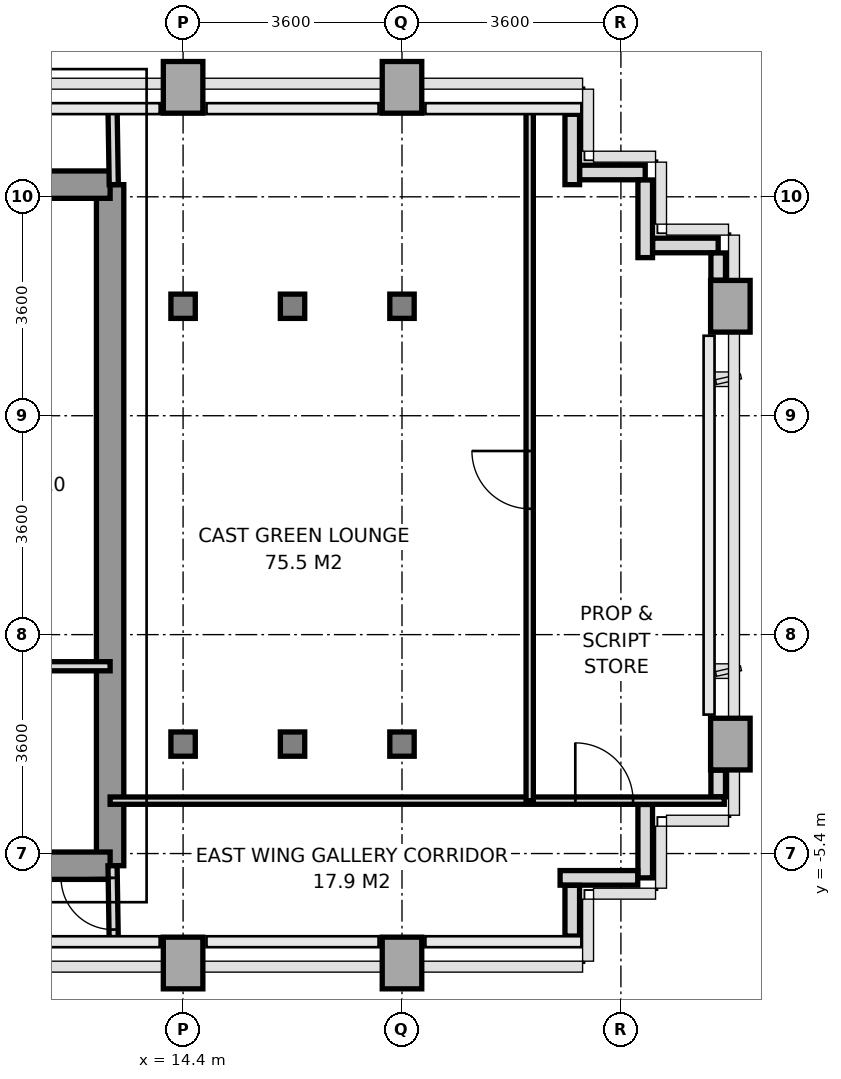
"""IFC4 building model, lengths in metres.
Left out: names, types, materials, properties, quantities, classifications, styles, units other than length and angle.
Written with IfcOpenShell. Run it as: python <this file> out.ifc"""

import sys

from ifc_helpers import new_model, si_unit, direction, frame, frame_2d, origin, origin_2d, place, context, subcontext, project, spatial, rectangle, i_section, extrude, source, transform, mapped, element, fill, save


model = new_model("IFC4")
c1 = context("Model", 3, precision=1e-05, world=origin(), true_north=direction((0.0, 1.0)))
c2 = subcontext(c1, "Body", "Model", "MODEL_VIEW")
j1 = project(units=[si_unit("LENGTHUNIT", "METRE"), si_unit("PLANEANGLEUNIT", "RADIAN")], contexts=[c1])
p1 = place(None, origin())
s1 = spatial("IfcSite", under=j1, at=p1, CompositionType="ELEMENT")
p2 = place(p1, origin())
s2 = spatial("IfcBuilding", under=s1, at=p2, CompositionType="ELEMENT")
p3 = place(p2, frame((0.0, 0.0, 114.2)))
s3 = spatial("IfcBuildingStorey", under=s2, at=p3, CompositionType="ELEMENT", Elevation=114.2)
m1 = source(origin(), c2, "Body", "SweptSolid", [
    extrude(rectangle(XDim=0.65, YDim=0.85, at=origin_2d()), origin(), (0.0, 0.0, 1.0), 3.2),
])
p4 = place(p3, frame((14.4, -7.2, 0.0), z_axis=(0.0, 0.0, 1.0), x_axis=(1.0, 0.0, 0.0)))
e1 = element("IfcColumn", 1, at=p4, inside=s3, PredefinedType="COLUMN", context=c2, shape_type="MappedRepresentation", body=[
    mapped(m1, transform((0.0, 0.0, 0.0), x_axis=(1.0, 0.0, 0.0), y_axis=(0.0, 1.0, 0.0), z_axis=(0.0, 0.0, 1.0), scale=1.0)),
])
m2 = source(origin(), c2, "Body", "SweptSolid", [
    extrude(i_section(OverallWidth=0.401, OverallDepth=0.399, WebThickness=0.02, FlangeThickness=0.032, at=origin_2d()), origin(), (0.0, 0.0, 1.0), 3.2),
])
for number, where, z_axis, x_axis in (
    (2, (14.4, -3.6, 0.0), (0.0, 0.0, 1.0), (1.0, 0.0, 0.0)),
    (3, (14.4, 3.6, 0.0), (0.0, 0.0, 1.0), (1.0, 0.0, 0.0)),
):
    element("IfcColumn", number, at=place(p3, frame(where, z_axis=z_axis, x_axis=x_axis)), inside=s3, PredefinedType="COLUMN", context=c2, shape_type="MappedRepresentation", body=[
        mapped(m2, transform((0.0, 0.0, 0.0), x_axis=(1.0, 0.0, 0.0), y_axis=(0.0, 1.0, 0.0), z_axis=(0.0, 0.0, 1.0), scale=1.0)),
    ])
p5 = place(p3, frame((14.4, 7.2, 0.0), z_axis=(0.0, 0.0, 1.0), x_axis=(1.0, 0.0, 0.0)))
e4 = element("IfcColumn", 4, at=p5, inside=s3, PredefinedType="COLUMN", context=c2, shape_type="MappedRepresentation", body=[
    mapped(m1, transform((0.0, 0.0, 0.0), x_axis=(1.0, 0.0, 0.0), y_axis=(0.0, 1.0, 0.0), z_axis=(0.0, 0.0, 1.0), scale=1.0)),
])
for number, where, z_axis, x_axis in (
    (5, (16.2, -3.6, 0.0), (0.0, 0.0, 1.0), (1.0, 0.0, 0.0)),
    (6, (16.2, 3.6, 0.0), (0.0, 0.0, 1.0), (1.0, 0.0, 0.0)),
):
    element("IfcColumn", number, at=place(p3, frame(where, z_axis=z_axis, x_axis=x_axis)), inside=s3, PredefinedType="COLUMN", context=c2, shape_type="MappedRepresentation", body=[
        mapped(m2, transform((0.0, 0.0, 0.0), x_axis=(1.0, 0.0, 0.0), y_axis=(0.0, 1.0, 0.0), z_axis=(0.0, 0.0, 1.0), scale=1.0)),
    ])
p6 = place(p3, frame((18.0, -7.2, 0.0), z_axis=(0.0, 0.0, 1.0), x_axis=(1.0, 0.0, 0.0)))
e7 = element("IfcColumn", 7, at=p6, inside=s3, PredefinedType="COLUMN", context=c2, shape_type="MappedRepresentation", body=[
    mapped(m1, transform((0.0, 0.0, 0.0), x_axis=(1.0, 0.0, 0.0), y_axis=(0.0, 1.0, 0.0), z_axis=(0.0, 0.0, 1.0), scale=1.0)),
])
for number, where, z_axis, x_axis in (
    (8, (18.0, -3.6, 0.0), (0.0, 0.0, 1.0), (1.0, 0.0, 0.0)),
    (9, (18.0, 3.6, 0.0), (0.0, 0.0, 1.0), (1.0, 0.0, 0.0)),
):
    element("IfcColumn", number, at=place(p3, frame(where, z_axis=z_axis, x_axis=x_axis)), inside=s3, PredefinedType="COLUMN", context=c2, shape_type="MappedRepresentation", body=[
        mapped(m2, transform((0.0, 0.0, 0.0), x_axis=(1.0, 0.0, 0.0), y_axis=(0.0, 1.0, 0.0), z_axis=(0.0, 0.0, 1.0), scale=1.0)),
    ])
for number, where, z_axis, x_axis in (
    (10, (18.0, 7.2, 0.0), (0.0, 0.0, 1.0), (1.0, 0.0, 0.0)),
    (11, (23.4, -3.6, 0.0), (0.0, 0.0, 1.0), (1.0, 0.0, 0.0)),
    (12, (23.4, 3.6, 0.0), (0.0, 0.0, 1.0), (1.0, 0.0, 0.0)),
):
    element("IfcColumn", number, at=place(p3, frame(where, z_axis=z_axis, x_axis=x_axis)), inside=s3, PredefinedType="COLUMN", context=c2, shape_type="MappedRepresentation", body=[
        mapped(m1, transform((0.0, 0.0, 0.0), x_axis=(1.0, 0.0, 0.0), y_axis=(0.0, 1.0, 0.0), z_axis=(0.0, 0.0, 1.0), scale=1.0)),
    ])
p7 = place(p3, frame((22.0, -4.593, 0.0), z_axis=(0.0, 0.0, 1.0), x_axis=(0.0, -1.0, 0.0)))
e13 = element("IfcWall", 13, at=p7, inside=s3, PredefinedType="PARAPET", context=c2, shape_type="SweptSolid", body=[
    extrude(rectangle(XDim=1.207, YDim=0.24, at=frame_2d((0.604, 0.0))), origin(), (0.0, 0.0, 1.0), 1.15),
])
p8 = place(p3, frame((21.877, -5.8, 0.0), z_axis=(0.0, 0.0, 1.0), x_axis=(-1.0, 0.0, 0.0)))
e14 = element("IfcWall", 14, at=p8, inside=s3, PredefinedType="PARAPET", context=c2, shape_type="SweptSolid", body=[
    extrude(rectangle(XDim=1.277, YDim=0.24, at=frame_2d((0.638, 0.0))), origin(), (0.0, 0.0, 1.0), 1.15),
])
p9 = place(p3, frame((20.8, -5.923, 0.0), z_axis=(0.0, 0.0, 1.0), x_axis=(0.0, -1.0, 0.0)))
e15 = element("IfcWall", 15, at=p9, inside=s3, PredefinedType="PARAPET", context=c2, shape_type="SweptSolid", body=[
    extrude(rectangle(XDim=0.834, YDim=0.24, at=frame_2d((0.417, 0.0))), origin(), (0.0, 0.0, 1.0), 1.15),
])
p10 = place(p3, frame((20.8, 6.757, 0.0), z_axis=(0.0, 0.0, 1.0), x_axis=(0.0, -1.0, 0.0)))
e16 = element("IfcWall", 16, at=p10, inside=s3, PredefinedType="PARAPET", context=c2, shape_type="SweptSolid", body=[
    extrude(rectangle(XDim=1.157, YDim=0.24, at=frame_2d((0.579, 0.0))), origin(), (0.0, 0.0, 1.0), 1.15),
])
p11 = place(p3, frame((20.923, 5.8, 0.0), z_axis=(0.0, 0.0, 1.0), x_axis=(1.0, 0.0, 0.0)))
e17 = element("IfcWall", 17, at=p11, inside=s3, PredefinedType="PARAPET", context=c2, shape_type="SweptSolid", body=[
    extrude(rectangle(XDim=1.077, YDim=0.24, at=frame_2d((0.539, 0.0))), origin(), (0.0, 0.0, 1.0), 1.15),
])
p12 = place(p3, frame((22.0, 5.677, 0.0), z_axis=(0.0, 0.0, 1.0), x_axis=(0.0, -1.0, 0.0)))
e18 = element("IfcWall", 18, at=p12, inside=s3, PredefinedType="PARAPET", context=c2, shape_type="SweptSolid", body=[
    extrude(rectangle(XDim=1.277, YDim=0.24, at=frame_2d((0.639, 0.0))), origin(), (0.0, 0.0, 1.0), 1.15),
])
p13 = place(p3, frame((22.123, 4.6, 0.0), z_axis=(0.0, 0.0, 1.0), x_axis=(1.0, 0.0, 0.0)))
e19 = element("IfcWall", 19, at=p13, inside=s3, PredefinedType="PARAPET", context=c2, shape_type="SweptSolid", body=[
    extrude(rectangle(XDim=1.077, YDim=0.24, at=frame_2d((0.539, 0.0))), origin(), (0.0, 0.0, 1.0), 1.15),
])
p14 = place(p3, frame((23.2, 4.477, 0.0), z_axis=(0.0, 0.0, 1.0), x_axis=(0.0, -1.0, 0.0)))
e20 = element("IfcWall", 20, at=p14, inside=s3, PredefinedType="PARAPET", context=c2, shape_type="SweptSolid", body=[
    extrude(rectangle(XDim=0.449, YDim=0.24, at=frame_2d((0.225, 0.0))), origin(), (0.0, 0.0, 1.0), 1.15),
])
p15 = place(p3, frame((23.2, -4.028, 0.0), z_axis=(0.0, 0.0, 1.0), x_axis=(0.0, -1.0, 0.0)))
e21 = element("IfcWall", 21, at=p15, inside=s3, PredefinedType="PARAPET", context=c2, shape_type="SweptSolid", body=[
    extrude(rectangle(XDim=0.439, YDim=0.24, at=frame_2d((0.219, 0.0))), origin(), (0.0, 0.0, 1.0), 1.15),
])
p16 = place(p3, frame((13.2, -5.6, 0.0), z_axis=(0.0, 0.0, 1.0), x_axis=(0.0, 1.0, 0.0)))
e22 = element("IfcWall", 22, at=p16, inside=s3, PredefinedType="SHEAR", context=c2, shape_type="SweptSolid", body=[
    extrude(rectangle(XDim=11.2, YDim=0.45, at=frame_2d((5.6, 0.0))), origin(), (0.0, 0.0, 1.0), 3.2),
])
p17 = place(p3, frame((11.381, 5.6, 0.0), z_axis=(0.0, 0.0, 1.0), x_axis=(1.0, 0.0, 0.0)))
e23 = element("IfcWall", 23, at=p17, inside=s3, PredefinedType="SHEAR", context=c2, shape_type="SweptSolid", body=[
    extrude(rectangle(XDim=1.819, YDim=0.45, at=frame_2d((0.909, 0.0))), origin(), (0.0, 0.0, 1.0), 3.2),
])
p18 = place(p3, frame((5.4, -5.6, 0.0), z_axis=(0.0, 0.0, 1.0), x_axis=(1.0, 0.0, 0.0)))
e24 = element("IfcWall", 24, at=p18, inside=s3, PredefinedType="SHEAR", context=c2, shape_type="SweptSolid", body=[
    extrude(rectangle(XDim=7.8, YDim=0.45, at=frame_2d((3.9, 0.0))), origin(), (0.0, 0.0, 1.0), 3.2),
])
p19 = place(p18, frame((3.0, 0.0, 0.0)))
e25 = element("IfcOpeningElement", 25, at=p19, cuts=e24, PredefinedType="OPENING", context=c2, shape_type="SweptSolid", body=[
    extrude(rectangle(XDim=1.2, YDim=2.2, at=frame_2d((0.6, 1.1))), frame((0.0, 0.235, 0.0), z_axis=(0.0, -1.0, 0.0), x_axis=(1.0, 0.0, 0.0)), (0.0, 0.0, 1.0), 0.47),
])
p20 = place(p18, frame((5.85, 0.0, 0.0)))
e26 = element("IfcOpeningElement", 26, at=p20, cuts=e24, PredefinedType="OPENING", context=c2, shape_type="SweptSolid", body=[
    extrude(rectangle(XDim=0.8, YDim=2.1, at=frame_2d((0.4, 1.05))), frame((0.0, 0.235, 0.0), z_axis=(0.0, -1.0, 0.0), x_axis=(1.0, 0.0, 0.0)), (0.0, 0.0, 1.0), 0.47),
])
p21 = place(p3, frame((11.02, -2.32, 0.0), z_axis=(0.0, 0.0, 1.0), x_axis=(1.0, 0.0, 0.0)))
e27 = element("IfcWall", 27, at=p21, inside=s3, PredefinedType="PARTITIONING", context=c2, shape_type="SweptSolid", body=[
    extrude(rectangle(XDim=2.18, YDim=0.15, at=frame_2d((1.09, 0.0))), origin(), (0.0, 0.0, 1.0), 3.2),
])
p22 = place(p3, frame((13.26, 5.6, 0.0), z_axis=(0.0, 0.0, 1.0), x_axis=(-0.016013571389, 0.999871774545, 0.0)))
e28 = element("IfcWall", 28, at=p22, inside=s3, PredefinedType="PARTITIONING", context=c2, shape_type="SweptSolid", body=[
    extrude(rectangle(XDim=1.25, YDim=0.15, at=frame_2d((0.625, 0.0))), origin(), (0.0, 0.0, 1.0), 3.2),
])
p23 = place(p3, frame((13.26, -6.85, 0.0), z_axis=(0.0, 0.0, 1.0), x_axis=(-0.016013571389, 0.999871774545, 0.0)))
e29 = element("IfcWall", 29, at=p23, inside=s3, PredefinedType="PARTITIONING", context=c2, shape_type="SweptSolid", body=[
    extrude(rectangle(XDim=1.25, YDim=0.15, at=frame_2d((0.625, 0.0))), origin(), (0.0, 0.0, 1.0), 3.2),
])
p24 = place(p23, frame((0.2, 0.0, 0.0)))
e30 = element("IfcOpeningElement", 30, at=p24, cuts=e29, PredefinedType="OPENING", context=c2, shape_type="SweptSolid", body=[
    extrude(rectangle(XDim=0.85, YDim=2.1, at=frame_2d((0.425, 1.05))), frame((0.0, 0.085, 0.0), z_axis=(0.0, -1.0, 0.0), x_axis=(1.0, 0.0, 0.0)), (0.0, 0.0, 1.0), 0.17),
])
p25 = place(p3, frame((13.2, -4.53, 0.0), z_axis=(0.0, 0.0, 1.0), x_axis=(1.0, 0.0, 0.0)))
e31 = element("IfcWall", 31, at=p25, inside=s3, PredefinedType="PARTITIONING", context=c2, shape_type="SweptSolid", body=[
    extrude(rectangle(XDim=10.1, YDim=0.12, at=frame_2d((5.05, 0.0))), origin(), (0.0, 0.0, 1.0), 2.75),
])
p26 = place(p25, frame((7.65, 0.0, 0.0)))
e32 = element("IfcOpeningElement", 32, at=p26, cuts=e31, PredefinedType="OPENING", context=c2, shape_type="SweptSolid", body=[
    extrude(rectangle(XDim=0.95, YDim=2.15, at=frame_2d((0.475, 1.075))), frame((0.0, 0.07, 0.0), z_axis=(0.0, -1.0, 0.0), x_axis=(1.0, 0.0, 0.0)), (0.0, 0.0, 1.0), 0.14),
])
p27 = place(p3, frame((20.1, -4.53, 0.0), z_axis=(0.0, 0.0, 1.0), x_axis=(0.0, 1.0, 0.0)))
e33 = element("IfcWall", 33, at=p27, inside=s3, PredefinedType="PARTITIONING", context=c2, shape_type="SweptSolid", body=[
    extrude(rectangle(XDim=11.38, YDim=0.12, at=frame_2d((5.69, 0.0))), origin(), (0.0, 0.0, 1.0), 2.7),
])
p28 = place(p27, frame((4.8, 0.0, 0.0)))
e34 = element("IfcOpeningElement", 34, at=p28, cuts=e33, PredefinedType="OPENING", context=c2, shape_type="SweptSolid", body=[
    extrude(rectangle(XDim=0.95, YDim=2.15, at=frame_2d((0.475, 1.075))), frame((0.0, 0.07, 0.0), z_axis=(0.0, -1.0, 0.0), x_axis=(1.0, 0.0, 0.0)), (0.0, 0.0, 1.0), 0.14),
])
m3 = source(origin(), c2, "Body", "SweptSolid", [
    extrude(rectangle(XDim=0.85, YDim=2.1, at=frame_2d((0.425, 1.05))), frame((0.0, 0.025, 0.0), z_axis=(0.0, -1.0, 0.0), x_axis=(1.0, 0.0, 0.0)), (0.0, 0.0, 1.0), 0.05),
])
p29 = place(p24, origin())
e35 = element("IfcDoor", 35, at=p29, inside=s3, OperationType="SINGLE_SWING_RIGHT", PredefinedType="DOOR", context=c2, shape_type="MappedRepresentation", body=[
    mapped(m3, transform((0.0, 0.0, 0.0), x_axis=(1.0, 0.0, 0.0), y_axis=(0.0, 1.0, 0.0), z_axis=(0.0, 0.0, 1.0), scale=1.0)),
])
fill(e30, e35)
m4 = source(origin(), c2, "Body", "SweptSolid", [
    extrude(rectangle(XDim=0.95, YDim=2.15, at=frame_2d((0.475, 1.075))), frame((0.0, 0.025, 0.0), z_axis=(0.0, -1.0, 0.0), x_axis=(1.0, 0.0, 0.0)), (0.0, 0.0, 1.0), 0.05),
])
p30 = place(p26, origin())
e36 = element("IfcDoor", 36, at=p30, inside=s3, OperationType="SINGLE_SWING_LEFT", PredefinedType="DOOR", context=c2, shape_type="MappedRepresentation", body=[
    mapped(m4, transform((0.0, 0.0, 0.0), x_axis=(1.0, 0.0, 0.0), y_axis=(0.0, 1.0, 0.0), z_axis=(0.0, 0.0, 1.0), scale=1.0)),
])
fill(e32, e36)
p31 = place(p28, origin())
e37 = element("IfcDoor", 37, at=p31, inside=s3, OperationType="SINGLE_SWING_RIGHT", PredefinedType="DOOR", context=c2, shape_type="MappedRepresentation", body=[
    mapped(m4, transform((0.0, 0.0, 0.0), x_axis=(1.0, 0.0, 0.0), y_axis=(0.0, 1.0, 0.0), z_axis=(0.0, 0.0, 1.0), scale=1.0)),
])
fill(e34, e37)
save(model, sys.argv[1])
